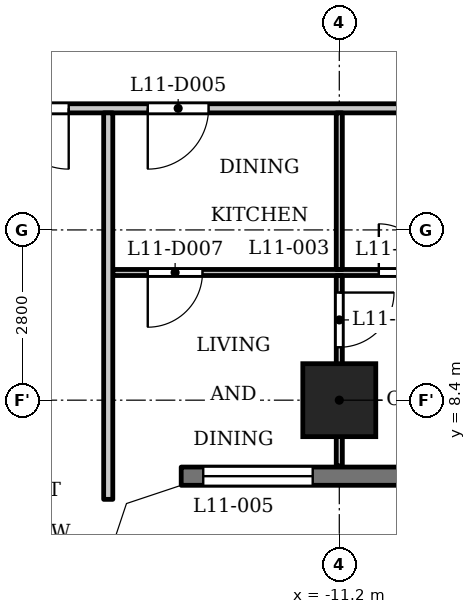
"""IFC4 building model, lengths in metres.
Left out: names, types, materials, properties, quantities, classifications, styles, units other than length and angle.
Written with IfcOpenShell. Run it as: python <this file> out.ifc"""

import sys

from ifc_helpers import new_model, si_unit, direction, frame, frame_2d, origin, origin_2d, place, context, subcontext, project, spatial, polyline, rectangle, outline, extrude, element, fill, save


model = new_model("IFC4")
c1 = context("Model", 3, precision=1e-05, world=origin(), true_north=direction((0.0, 1.0)))
c2 = subcontext(c1, "Body", "Model", "MODEL_VIEW")
j1 = project(units=[si_unit("LENGTHUNIT", "METRE"), si_unit("PLANEANGLEUNIT", "RADIAN")], contexts=[c1])
p1 = place(None, origin())
s1 = spatial("IfcSite", under=j1, at=p1, CompositionType="ELEMENT")
p2 = place(p1, origin())
s2 = spatial("IfcBuilding", under=s1, at=p2, CompositionType="ELEMENT")
p3 = place(p2, frame((0.0, 0.0, 48.0)))
s3 = spatial("IfcBuildingStorey", under=s2, at=p3, CompositionType="ELEMENT", Elevation=48.0)
p4 = place(p3, frame((-11.2, 8.4, 0.0), z_axis=(0.0, 0.0, 1.0), x_axis=(1.0, 0.0, 0.0)))
e1 = element("IfcColumn", 1, at=p4, inside=s3, PredefinedType="COLUMN", context=c2, shape_type="SweptSolid", body=[
    extrude(rectangle(XDim=1.2, YDim=1.2, at=origin_2d()), origin(), (0.0, 0.0, 1.0), 3.5),
])
p5 = place(p3, frame((-13.8, 7.15, 0.0), z_axis=(0.0, 0.0, 1.0), x_axis=(1.0, 0.0, 0.0)))
e2 = element("IfcWall", 2, at=p5, inside=s3, PredefinedType="SOLIDWALL", context=c2, shape_type="SweptSolid", body=[
    extrude(rectangle(XDim=27.6, YDim=0.3, at=frame_2d((13.8, 0.0))), origin(), (0.0, 0.0, 1.0), 3.2),
])
p6 = place(p5, frame((0.363, 0.0, 0.9)))
e3 = element("IfcOpeningElement", 3, at=p6, cuts=e2, PredefinedType="OPENING", context=c2, shape_type="SweptSolid", body=[
    extrude(rectangle(XDim=1.8, YDim=1.25, at=frame_2d((0.9, 0.625))), frame((0.0, 0.16, 0.0), z_axis=(0.0, -1.0, 0.0), x_axis=(1.0, 0.0, 0.0)), (0.0, 0.0, 1.0), 0.32),
])
p7 = place(p5, frame((3.6, 0.0, 1.2)))
e4 = element("IfcOpeningElement", 4, at=p7, cuts=e2, PredefinedType="OPENING", context=c2, shape_type="SweptSolid", body=[
    extrude(rectangle(XDim=3.6, YDim=0.95, at=frame_2d((1.8, 0.475))), frame((0.0, 0.16, 0.0), z_axis=(0.0, -1.0, 0.0), x_axis=(1.0, 0.0, 0.0)), (0.0, 0.0, 1.0), 0.32),
])
p8 = place(p5, frame((9.2, 0.0, 1.2)))
e5 = element("IfcOpeningElement", 5, at=p8, cuts=e2, PredefinedType="OPENING", context=c2, shape_type="SweptSolid", body=[
    extrude(rectangle(XDim=3.6, YDim=0.95, at=frame_2d((1.8, 0.475))), frame((0.0, 0.16, 0.0), z_axis=(0.0, -1.0, 0.0), x_axis=(1.0, 0.0, 0.0)), (0.0, 0.0, 1.0), 0.32),
])
p9 = place(p5, frame((14.8, 0.0, 1.2)))
e6 = element("IfcOpeningElement", 6, at=p9, cuts=e2, PredefinedType="OPENING", context=c2, shape_type="SweptSolid", body=[
    extrude(rectangle(XDim=3.6, YDim=0.95, at=frame_2d((1.8, 0.475))), frame((0.0, 0.16, 0.0), z_axis=(0.0, -1.0, 0.0), x_axis=(1.0, 0.0, 0.0)), (0.0, 0.0, 1.0), 0.32),
])
p10 = place(p5, frame((20.4, 0.0, 1.2)))
e7 = element("IfcOpeningElement", 7, at=p10, cuts=e2, PredefinedType="OPENING", context=c2, shape_type="SweptSolid", body=[
    extrude(rectangle(XDim=3.6, YDim=0.95, at=frame_2d((1.8, 0.475))), frame((0.0, 0.16, 0.0), z_axis=(0.0, -1.0, 0.0), x_axis=(1.0, 0.0, 0.0)), (0.0, 0.0, 1.0), 0.32),
])
p11 = place(p5, frame((25.438, 0.0, 0.9)))
e8 = element("IfcOpeningElement", 8, at=p11, cuts=e2, PredefinedType="OPENING", context=c2, shape_type="SweptSolid", body=[
    extrude(rectangle(XDim=1.8, YDim=1.25, at=frame_2d((0.9, 0.625))), frame((0.0, 0.16, 0.0), z_axis=(0.0, -1.0, 0.0), x_axis=(1.0, 0.0, 0.0)), (0.0, 0.0, 1.0), 0.32),
])
p12 = place(p3, frame((-14.925, 10.5, 0.0), z_axis=(0.0, 0.0, 1.0), x_axis=(1.0, 0.0, 0.0)))
e9 = element("IfcWall", 9, at=p12, inside=s3, PredefinedType="PARTITIONING", context=c2, shape_type="SweptSolid", body=[
    extrude(rectangle(XDim=29.85, YDim=0.1, at=frame_2d((14.925, 0.0))), origin(), (0.0, 0.0, 1.0), 3.2),
])
p13 = place(p12, frame((4.375, 0.0, 0.0)))
e10 = element("IfcOpeningElement", 10, at=p13, cuts=e9, PredefinedType="OPENING", context=c2, shape_type="SweptSolid", body=[
    extrude(rectangle(XDim=0.8, YDim=2.1, at=frame_2d((0.4, 1.05))), frame((0.0, 0.06, 0.0), z_axis=(0.0, -1.0, 0.0), x_axis=(1.0, 0.0, 0.0)), (0.0, 0.0, 1.0), 0.12),
])
p14 = place(p12, frame((0.575, 0.0, 0.0)))
e11 = element("IfcOpeningElement", 11, at=p14, cuts=e9, PredefinedType="OPENING", context=c2, shape_type="SweptSolid", body=[
    extrude(rectangle(XDim=0.9, YDim=2.1, at=frame_2d((0.45, 1.05))), frame((0.0, 0.06, 0.0), z_axis=(0.0, -1.0, 0.0), x_axis=(1.0, 0.0, 0.0)), (0.0, 0.0, 1.0), 0.12),
])
p15 = place(p12, frame((13.475, 0.0, 0.0)))
e12 = element("IfcOpeningElement", 12, at=p15, cuts=e9, PredefinedType="OPENING", context=c2, shape_type="SweptSolid", body=[
    extrude(rectangle(XDim=0.8, YDim=2.1, at=frame_2d((0.4, 1.05))), frame((0.0, 0.06, 0.0), z_axis=(0.0, -1.0, 0.0), x_axis=(1.0, 0.0, 0.0)), (0.0, 0.0, 1.0), 0.12),
])
p16 = place(p12, frame((9.975, 0.0, 0.0)))
e13 = element("IfcOpeningElement", 13, at=p16, cuts=e9, PredefinedType="OPENING", context=c2, shape_type="SweptSolid", body=[
    extrude(rectangle(XDim=0.9, YDim=2.1, at=frame_2d((0.45, 1.05))), frame((0.0, 0.06, 0.0), z_axis=(0.0, -1.0, 0.0), x_axis=(1.0, 0.0, 0.0)), (0.0, 0.0, 1.0), 0.12),
])
p17 = place(p12, frame((19.075, 0.0, 0.0)))
e14 = element("IfcOpeningElement", 14, at=p17, cuts=e9, PredefinedType="OPENING", context=c2, shape_type="SweptSolid", body=[
    extrude(rectangle(XDim=0.8, YDim=2.1, at=frame_2d((0.4, 1.05))), frame((0.0, 0.06, 0.0), z_axis=(0.0, -1.0, 0.0), x_axis=(1.0, 0.0, 0.0)), (0.0, 0.0, 1.0), 0.12),
])
p18 = place(p12, frame((16.075, 0.0, 0.0)))
e15 = element("IfcOpeningElement", 15, at=p18, cuts=e9, PredefinedType="OPENING", context=c2, shape_type="SweptSolid", body=[
    extrude(rectangle(XDim=0.9, YDim=2.1, at=frame_2d((0.45, 1.05))), frame((0.0, 0.06, 0.0), z_axis=(0.0, -1.0, 0.0), x_axis=(1.0, 0.0, 0.0)), (0.0, 0.0, 1.0), 0.12),
])
p19 = place(p12, frame((21.175, 0.0, 0.0)))
e16 = element("IfcOpeningElement", 16, at=p19, cuts=e9, PredefinedType="OPENING", context=c2, shape_type="SweptSolid", body=[
    extrude(rectangle(XDim=0.8, YDim=2.1, at=frame_2d((0.4, 1.05))), frame((0.0, 0.06, 0.0), z_axis=(0.0, -1.0, 0.0), x_axis=(1.0, 0.0, 0.0)), (0.0, 0.0, 1.0), 0.12),
])
p20 = place(p12, frame((26.775, 0.0, 0.0)))
e17 = element("IfcOpeningElement", 17, at=p20, cuts=e9, PredefinedType="OPENING", context=c2, shape_type="SweptSolid", body=[
    extrude(rectangle(XDim=0.9, YDim=2.1, at=frame_2d((0.45, 1.05))), frame((0.0, 0.06, 0.0), z_axis=(0.0, -1.0, 0.0), x_axis=(1.0, 0.0, 0.0)), (0.0, 0.0, 1.0), 0.12),
])
p21 = place(p3, frame((-17.4, 13.2, 0.0), z_axis=(0.0, 0.0, 1.0), x_axis=(1.0, 0.0, 0.0)))
e18 = element("IfcWall", 18, at=p21, inside=s3, PredefinedType="PARTITIONING", context=c2, shape_type="SweptSolid", body=[
    extrude(rectangle(XDim=34.8, YDim=0.15, at=frame_2d((17.4, 0.0))), origin(), (0.0, 0.0, 1.0), 3.2),
])
p22 = place(p21, frame((0.75, 0.0, 0.0)))
e19 = element("IfcOpeningElement", 19, at=p22, cuts=e18, PredefinedType="OPENING", context=c2, shape_type="SweptSolid", body=[
    extrude(rectangle(XDim=1.0, YDim=2.1, at=frame_2d((0.5, 1.05))), frame((0.0, 0.085, 0.0), z_axis=(0.0, -1.0, 0.0), x_axis=(1.0, 0.0, 0.0)), (0.0, 0.0, 1.0), 0.17),
])
p23 = place(p21, frame((33.15, 0.0, 0.0)))
e20 = element("IfcOpeningElement", 20, at=p23, cuts=e18, PredefinedType="OPENING", context=c2, shape_type="SweptSolid", body=[
    extrude(rectangle(XDim=1.0, YDim=2.1, at=frame_2d((0.5, 1.05))), frame((0.0, 0.085, 0.0), z_axis=(0.0, -1.0, 0.0), x_axis=(1.0, 0.0, 0.0)), (0.0, 0.0, 1.0), 0.17),
])
p24 = place(p21, frame((3.05, 0.0, 0.0)))
e21 = element("IfcOpeningElement", 21, at=p24, cuts=e18, PredefinedType="OPENING", context=c2, shape_type="SweptSolid", body=[
    extrude(rectangle(XDim=1.0, YDim=2.1, at=frame_2d((0.5, 1.05))), frame((0.0, 0.085, 0.0), z_axis=(0.0, -1.0, 0.0), x_axis=(1.0, 0.0, 0.0)), (0.0, 0.0, 1.0), 0.17),
])
p25 = place(p21, frame((12.45, 0.0, 0.0)))
e22 = element("IfcOpeningElement", 22, at=p25, cuts=e18, PredefinedType="OPENING", context=c2, shape_type="SweptSolid", body=[
    extrude(rectangle(XDim=1.0, YDim=2.1, at=frame_2d((0.5, 1.05))), frame((0.0, 0.085, 0.0), z_axis=(0.0, -1.0, 0.0), x_axis=(1.0, 0.0, 0.0)), (0.0, 0.0, 1.0), 0.17),
])
p26 = place(p21, frame((18.3, 0.0, 0.0)))
e23 = element("IfcOpeningElement", 23, at=p26, cuts=e18, PredefinedType="OPENING", context=c2, shape_type="SweptSolid", body=[
    extrude(rectangle(XDim=1.0, YDim=2.1, at=frame_2d((0.5, 1.05))), frame((0.0, 0.085, 0.0), z_axis=(0.0, -1.0, 0.0), x_axis=(1.0, 0.0, 0.0)), (0.0, 0.0, 1.0), 0.17),
])
p27 = place(p21, frame((29.25, 0.0, 0.0)))
e24 = element("IfcOpeningElement", 24, at=p27, cuts=e18, PredefinedType="OPENING", context=c2, shape_type="SweptSolid", body=[
    extrude(rectangle(XDim=1.0, YDim=2.1, at=frame_2d((0.5, 1.05))), frame((0.0, 0.085, 0.0), z_axis=(0.0, -1.0, 0.0), x_axis=(1.0, 0.0, 0.0)), (0.0, 0.0, 1.0), 0.17),
])
p28 = place(p3, frame((-15.0, 6.769, 0.0), z_axis=(0.0, 0.0, 1.0), x_axis=(0.0, 1.0, 0.0)))
e25 = element("IfcWall", 25, at=p28, inside=s3, PredefinedType="PARTITIONING", context=c2, shape_type="SweptSolid", body=[
    extrude(rectangle(XDim=6.356, YDim=0.15, at=frame_2d((3.178, 0.0))), origin(), (0.0, 0.0, 1.0), 3.2),
])
p29 = place(p3, frame((-11.2, 7.32, 0.0), z_axis=(0.0, 0.0, 1.0), x_axis=(0.0, 1.0, 0.0)))
e26 = element("IfcWall", 26, at=p29, inside=s3, PredefinedType="PARTITIONING", context=c2, shape_type="SweptSolid", body=[
    extrude(rectangle(XDim=3.13, YDim=0.1, at=frame_2d((1.565, 0.0))), origin(), (0.0, 0.0, 1.0), 3.2),
])
p30 = place(p29, frame((1.95, 0.0, 0.0)))
e27 = element("IfcOpeningElement", 27, at=p30, cuts=e26, PredefinedType="OPENING", context=c2, shape_type="SweptSolid", body=[
    extrude(rectangle(XDim=0.9, YDim=2.1, at=frame_2d((0.45, 1.05))), frame((0.0, 0.06, 0.0), z_axis=(0.0, -1.0, 0.0), x_axis=(1.0, 0.0, 0.0)), (0.0, 0.0, 1.0), 0.12),
])
p31 = place(p3, frame((-11.2, 10.55, 0.0), z_axis=(0.0, 0.0, 1.0), x_axis=(0.0, 1.0, 0.0)))
e28 = element("IfcWall", 28, at=p31, inside=s3, PredefinedType="PARTITIONING", context=c2, shape_type="SweptSolid", body=[
    extrude(rectangle(XDim=2.575, YDim=0.1, at=frame_2d((1.288, 0.0))), origin(), (0.0, 0.0, 1.0), 3.2),
])
p32 = place(p3, origin())
e29 = element("IfcWall", 29, at=p32, inside=s3, PredefinedType="SOLIDWALL", context=c2, shape_type="SweptSolid", body=[
    extrude(outline(polyline([(-13.849, 7.3), (-14.937, 6.937), (-15.3, 5.849), (-15.3, 5.8), (-15.0, 5.8), (-14.7, 6.7), (-13.8, 7.0), (-13.8, 7.3), (-13.849, 7.3)])), origin(), (0.0, 0.0, 1.0), 3.2),
])
p33 = place(p22, origin())
e30 = element("IfcDoor", 30, at=p33, inside=s3, OperationType="SINGLE_SWING_RIGHT", PredefinedType="DOOR", context=c2, shape_type="SweptSolid", body=[
    extrude(rectangle(XDim=1.0, YDim=2.1, at=frame_2d((0.5, 1.05))), frame((0.0, 0.025, 0.0), z_axis=(0.0, -1.0, 0.0), x_axis=(1.0, 0.0, 0.0)), (0.0, 0.0, 1.0), 0.05),
])
fill(e19, e30)
p34 = place(p24, origin())
e31 = element("IfcDoor", 31, at=p34, inside=s3, OperationType="SINGLE_SWING_LEFT", PredefinedType="DOOR", context=c2, shape_type="SweptSolid", body=[
    extrude(rectangle(XDim=1.0, YDim=2.1, at=frame_2d((0.5, 1.05))), frame((0.0, 0.025, 0.0), z_axis=(0.0, -1.0, 0.0), x_axis=(1.0, 0.0, 0.0)), (0.0, 0.0, 1.0), 0.05),
])
fill(e21, e31)
p35 = place(p13, origin())
e32 = element("IfcDoor", 32, at=p35, inside=s3, OperationType="SINGLE_SWING_RIGHT", PredefinedType="DOOR", context=c2, shape_type="SweptSolid", body=[
    extrude(rectangle(XDim=0.8, YDim=2.1, at=frame_2d((0.4, 1.05))), frame((0.0, 0.025, 0.0), z_axis=(0.0, -1.0, 0.0), x_axis=(1.0, 0.0, 0.0)), (0.0, 0.0, 1.0), 0.05),
])
fill(e10, e32)
p36 = place(p14, origin())
e33 = element("IfcDoor", 33, at=p36, inside=s3, OperationType="SINGLE_SWING_LEFT", PredefinedType="DOOR", context=c2, shape_type="SweptSolid", body=[
    extrude(rectangle(XDim=0.9, YDim=2.1, at=frame_2d((0.45, 1.05))), frame((0.0, 0.025, 0.0), z_axis=(0.0, -1.0, 0.0), x_axis=(1.0, 0.0, 0.0)), (0.0, 0.0, 1.0), 0.05),
])
fill(e11, e33)
p37 = place(p30, origin())
e34 = element("IfcDoor", 34, at=p37, inside=s3, OperationType="SINGLE_SWING_RIGHT", PredefinedType="DOOR", context=c2, shape_type="SweptSolid", body=[
    extrude(rectangle(XDim=0.9, YDim=2.1, at=frame_2d((0.45, 1.05))), frame((0.0, 0.025, 0.0), z_axis=(0.0, -1.0, 0.0), x_axis=(1.0, 0.0, 0.0)), (0.0, 0.0, 1.0), 0.05),
])
fill(e27, e34)
p38 = place(p6, origin())
e35 = element("IfcWindow", 35, at=p38, inside=s3, PartitioningType="SINGLE_PANEL", PredefinedType="WINDOW", context=c2, shape_type="SweptSolid", body=[
    extrude(rectangle(XDim=1.8, YDim=1.25, at=frame_2d((0.9, 0.625))), frame((0.0, 0.03, 0.0), z_axis=(0.0, -1.0, 0.0), x_axis=(1.0, 0.0, 0.0)), (0.0, 0.0, 1.0), 0.06),
])
fill(e3, e35)
save(model, sys.argv[1])
